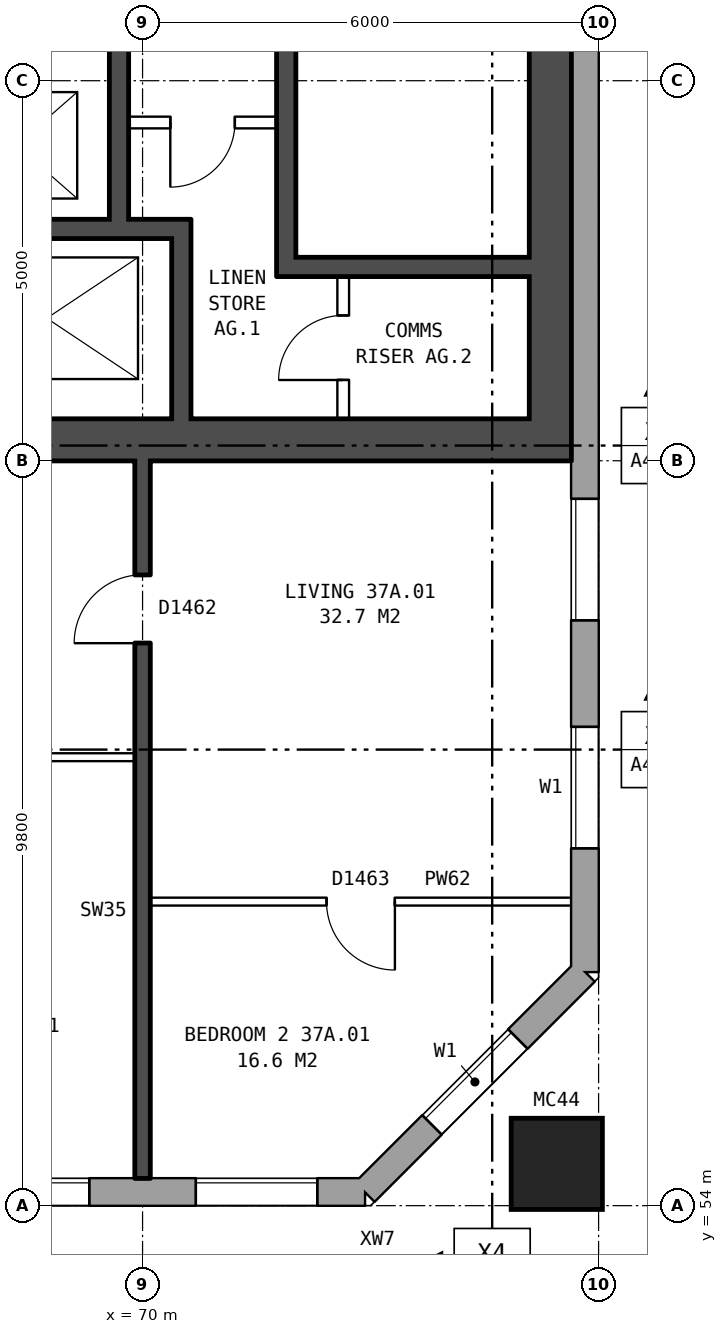
"""IFC4 building model, lengths in metres.
Left out: names, types, materials, properties, quantities, classifications, styles, units other than length and angle.
Written with IfcOpenShell. Run it as: python <this file> out.ifc"""

import sys

from ifc_helpers import new_model, si_unit, direction, frame, frame_2d, origin, origin_2d, place, context, subcontext, project, spatial, rectangle, hollow_rectangle, extrude, element, fill, save


model = new_model("IFC4")
c1 = context("Model", 3, precision=1e-05, world=origin(), true_north=direction((0.0, 1.0)))
c2 = subcontext(c1, "Body", "Model", "MODEL_VIEW")
j1 = project(units=[si_unit("LENGTHUNIT", "METRE"), si_unit("PLANEANGLEUNIT", "RADIAN")], contexts=[c1])
p1 = place(None, origin())
s1 = spatial("IfcSite", under=j1, at=p1, CompositionType="ELEMENT")
p2 = place(p1, origin())
s2 = spatial("IfcBuilding", under=s1, at=p2, CompositionType="ELEMENT")
p3 = place(p2, frame((0.0, 0.0, 133.0)))
s3 = spatial("IfcBuildingStorey", under=s2, at=p3, CompositionType="ELEMENT", Elevation=133.0)
p4 = place(p3, frame((75.45, 54.55, 0.0), z_axis=(0.0, 0.0, 1.0), x_axis=(1.0, 0.0, 0.0)))
e1 = element("IfcColumn", 1, at=p4, inside=s3, PredefinedType="COLUMN", context=c2, shape_type="SweptSolid", body=[
    extrude(hollow_rectangle(XDim=1.2, YDim=1.2, WallThickness=0.065, at=origin_2d()), origin(), (0.0, 0.0, 1.0), 3.1),
])
p5 = place(p3, frame((29.825, 54.18, 0.0), z_axis=(0.0, 0.0, 1.0), x_axis=(1.0, 0.0, 0.0)))
e2 = element("IfcWall", 2, at=p5, inside=s3, PredefinedType="STANDARD", context=c2, shape_type="SweptSolid", body=[
    extrude(rectangle(XDim=43.101, YDim=0.36, at=frame_2d((21.55, 0.0))), origin(), (0.0, 0.0, 1.0), 2.85),
])
p6 = place(p5, frame((1.875, 0.0, 0.8)))
e3 = element("IfcOpeningElement", 3, at=p6, cuts=e2, PredefinedType="OPENING", context=c2, shape_type="SweptSolid", body=[
    extrude(rectangle(XDim=1.6, YDim=1.8, at=frame_2d((0.8, 0.9))), frame((0.0, 0.19, 0.0), z_axis=(0.0, -1.0, 0.0), x_axis=(1.0, 0.0, 0.0)), (0.0, 0.0, 1.0), 0.38),
])
p7 = place(p5, frame((4.875, 0.0, 0.8)))
e4 = element("IfcOpeningElement", 4, at=p7, cuts=e2, PredefinedType="OPENING", context=c2, shape_type="SweptSolid", body=[
    extrude(rectangle(XDim=1.6, YDim=1.8, at=frame_2d((0.8, 0.9))), frame((0.0, 0.19, 0.0), z_axis=(0.0, -1.0, 0.0), x_axis=(1.0, 0.0, 0.0)), (0.0, 0.0, 1.0), 0.38),
])
p8 = place(p5, frame((7.875, 0.0, 0.8)))
e5 = element("IfcOpeningElement", 5, at=p8, cuts=e2, PredefinedType="OPENING", context=c2, shape_type="SweptSolid", body=[
    extrude(rectangle(XDim=1.6, YDim=1.8, at=frame_2d((0.8, 0.9))), frame((0.0, 0.19, 0.0), z_axis=(0.0, -1.0, 0.0), x_axis=(1.0, 0.0, 0.0)), (0.0, 0.0, 1.0), 0.38),
])
p9 = place(p5, frame((10.875, 0.0, 0.8)))
e6 = element("IfcOpeningElement", 6, at=p9, cuts=e2, PredefinedType="OPENING", context=c2, shape_type="SweptSolid", body=[
    extrude(rectangle(XDim=1.6, YDim=1.8, at=frame_2d((0.8, 0.9))), frame((0.0, 0.19, 0.0), z_axis=(0.0, -1.0, 0.0), x_axis=(1.0, 0.0, 0.0)), (0.0, 0.0, 1.0), 0.38),
])
p10 = place(p5, frame((14.275, 0.0, 0.8)))
e7 = element("IfcOpeningElement", 7, at=p10, cuts=e2, PredefinedType="OPENING", context=c2, shape_type="SweptSolid", body=[
    extrude(rectangle(XDim=0.8, YDim=0.9, at=frame_2d((0.4, 0.45))), frame((0.0, 0.19, 0.0), z_axis=(0.0, -1.0, 0.0), x_axis=(1.0, 0.0, 0.0)), (0.0, 0.0, 1.0), 0.38),
])
p11 = place(p5, frame((16.875, 0.0, 0.8)))
e8 = element("IfcOpeningElement", 8, at=p11, cuts=e2, PredefinedType="OPENING", context=c2, shape_type="SweptSolid", body=[
    extrude(rectangle(XDim=1.6, YDim=1.8, at=frame_2d((0.8, 0.9))), frame((0.0, 0.19, 0.0), z_axis=(0.0, -1.0, 0.0), x_axis=(1.0, 0.0, 0.0)), (0.0, 0.0, 1.0), 0.38),
])
p12 = place(p5, frame((19.875, 0.0, 0.8)))
e9 = element("IfcOpeningElement", 9, at=p12, cuts=e2, PredefinedType="OPENING", context=c2, shape_type="SweptSolid", body=[
    extrude(rectangle(XDim=1.6, YDim=1.8, at=frame_2d((0.8, 0.9))), frame((0.0, 0.19, 0.0), z_axis=(0.0, -1.0, 0.0), x_axis=(1.0, 0.0, 0.0)), (0.0, 0.0, 1.0), 0.38),
])
p13 = place(p5, frame((22.875, 0.0, 0.8)))
e10 = element("IfcOpeningElement", 10, at=p13, cuts=e2, PredefinedType="OPENING", context=c2, shape_type="SweptSolid", body=[
    extrude(rectangle(XDim=1.6, YDim=1.8, at=frame_2d((0.8, 0.9))), frame((0.0, 0.19, 0.0), z_axis=(0.0, -1.0, 0.0), x_axis=(1.0, 0.0, 0.0)), (0.0, 0.0, 1.0), 0.38),
])
p14 = place(p5, frame((25.875, 0.0, 0.8)))
e11 = element("IfcOpeningElement", 11, at=p14, cuts=e2, PredefinedType="OPENING", context=c2, shape_type="SweptSolid", body=[
    extrude(rectangle(XDim=1.6, YDim=1.8, at=frame_2d((0.8, 0.9))), frame((0.0, 0.19, 0.0), z_axis=(0.0, -1.0, 0.0), x_axis=(1.0, 0.0, 0.0)), (0.0, 0.0, 1.0), 0.38),
])
p15 = place(p5, frame((28.375, 0.0, 0.25)))
e12 = element("IfcOpeningElement", 12, at=p15, cuts=e2, PredefinedType="OPENING", context=c2, shape_type="SweptSolid", body=[
    extrude(rectangle(XDim=1.0, YDim=0.9, at=frame_2d((0.5, 0.45))), frame((0.0, 0.19, 0.0), z_axis=(0.0, -1.0, 0.0), x_axis=(1.0, 0.0, 0.0)), (0.0, 0.0, 1.0), 0.38),
])
p16 = place(p5, frame((31.875, 0.0, 0.8)))
e13 = element("IfcOpeningElement", 13, at=p16, cuts=e2, PredefinedType="OPENING", context=c2, shape_type="SweptSolid", body=[
    extrude(rectangle(XDim=1.6, YDim=1.8, at=frame_2d((0.8, 0.9))), frame((0.0, 0.19, 0.0), z_axis=(0.0, -1.0, 0.0), x_axis=(1.0, 0.0, 0.0)), (0.0, 0.0, 1.0), 0.38),
])
p17 = place(p5, frame((34.875, 0.0, 0.8)))
e14 = element("IfcOpeningElement", 14, at=p17, cuts=e2, PredefinedType="OPENING", context=c2, shape_type="SweptSolid", body=[
    extrude(rectangle(XDim=1.6, YDim=1.8, at=frame_2d((0.8, 0.9))), frame((0.0, 0.19, 0.0), z_axis=(0.0, -1.0, 0.0), x_axis=(1.0, 0.0, 0.0)), (0.0, 0.0, 1.0), 0.38),
])
p18 = place(p5, frame((37.875, 0.0, 0.8)))
e15 = element("IfcOpeningElement", 15, at=p18, cuts=e2, PredefinedType="OPENING", context=c2, shape_type="SweptSolid", body=[
    extrude(rectangle(XDim=1.6, YDim=1.8, at=frame_2d((0.8, 0.9))), frame((0.0, 0.19, 0.0), z_axis=(0.0, -1.0, 0.0), x_axis=(1.0, 0.0, 0.0)), (0.0, 0.0, 1.0), 0.38),
])
p19 = place(p5, frame((40.875, 0.0, 0.8)))
e16 = element("IfcOpeningElement", 16, at=p19, cuts=e2, PredefinedType="OPENING", context=c2, shape_type="SweptSolid", body=[
    extrude(rectangle(XDim=1.6, YDim=1.8, at=frame_2d((0.8, 0.9))), frame((0.0, 0.19, 0.0), z_axis=(0.0, -1.0, 0.0), x_axis=(1.0, 0.0, 0.0)), (0.0, 0.0, 1.0), 0.38),
])
p20 = place(p5, frame((15.375, 0.0, 0.8)))
e17 = element("IfcOpeningElement", 17, at=p20, cuts=e2, PredefinedType="OPENING", context=c2, shape_type="SweptSolid", body=[
    extrude(rectangle(XDim=0.6, YDim=1.8, at=frame_2d((0.3, 0.9))), frame((0.0, 0.19, 0.0), z_axis=(0.0, -1.0, 0.0), x_axis=(1.0, 0.0, 0.0)), (0.0, 0.0, 1.0), 0.38),
])
p21 = place(p5, frame((30.025, 0.0, 1.65)))
e18 = element("IfcOpeningElement", 18, at=p21, cuts=e2, PredefinedType="OPENING", context=c2, shape_type="SweptSolid", body=[
    extrude(rectangle(XDim=1.0, YDim=0.9, at=frame_2d((0.5, 0.45))), frame((0.0, 0.19, 0.0), z_axis=(0.0, -1.0, 0.0), x_axis=(1.0, 0.0, 0.0)), (0.0, 0.0, 1.0), 0.38),
])
p22 = place(p3, frame((72.925, 54.18, 0.0), z_axis=(0.0, 0.0, 1.0), x_axis=(0.707106781187, 0.707106781187, 0.0)))
e19 = element("IfcWall", 19, at=p22, inside=s3, PredefinedType="STANDARD", context=c2, shape_type="SweptSolid", body=[
    extrude(rectangle(XDim=4.094, YDim=0.36, at=frame_2d((2.047, 0.0))), origin(), (0.0, 0.0, 1.0), 2.85),
])
p23 = place(p22, frame((1.247, 0.0, 0.8)))
e20 = element("IfcOpeningElement", 20, at=p23, cuts=e19, PredefinedType="OPENING", context=c2, shape_type="SweptSolid", body=[
    extrude(rectangle(XDim=1.6, YDim=1.8, at=frame_2d((0.8, 0.9))), frame((0.0, 0.19, 0.0), z_axis=(0.0, -1.0, 0.0), x_axis=(1.0, 0.0, 0.0)), (0.0, 0.0, 1.0), 0.38),
])
p24 = place(p3, frame((75.82, 57.075, 0.0), z_axis=(0.0, 0.0, 1.0), x_axis=(0.0, 1.0, 0.0)))
e21 = element("IfcWall", 21, at=p24, inside=s3, PredefinedType="STANDARD", context=c2, shape_type="SweptSolid", body=[
    extrude(rectangle(XDim=25.851, YDim=0.36, at=frame_2d((12.925, 0.0))), origin(), (0.0, 0.0, 1.0), 2.85),
])
p25 = place(p24, frame((1.625, 0.0, 0.8)))
e22 = element("IfcOpeningElement", 22, at=p25, cuts=e21, PredefinedType="OPENING", context=c2, shape_type="SweptSolid", body=[
    extrude(rectangle(XDim=1.6, YDim=1.8, at=frame_2d((0.8, 0.9))), frame((0.0, 0.19, 0.0), z_axis=(0.0, -1.0, 0.0), x_axis=(1.0, 0.0, 0.0)), (0.0, 0.0, 1.0), 0.38),
])
p26 = place(p24, frame((4.625, 0.0, 0.8)))
e23 = element("IfcOpeningElement", 23, at=p26, cuts=e21, PredefinedType="OPENING", context=c2, shape_type="SweptSolid", body=[
    extrude(rectangle(XDim=1.6, YDim=1.8, at=frame_2d((0.8, 0.9))), frame((0.0, 0.19, 0.0), z_axis=(0.0, -1.0, 0.0), x_axis=(1.0, 0.0, 0.0)), (0.0, 0.0, 1.0), 0.38),
])
p27 = place(p24, frame((19.625, 0.0, 0.8)))
e24 = element("IfcOpeningElement", 24, at=p27, cuts=e21, PredefinedType="OPENING", context=c2, shape_type="SweptSolid", body=[
    extrude(rectangle(XDim=1.6, YDim=1.8, at=frame_2d((0.8, 0.9))), frame((0.0, 0.19, 0.0), z_axis=(0.0, -1.0, 0.0), x_axis=(1.0, 0.0, 0.0)), (0.0, 0.0, 1.0), 0.38),
])
p28 = place(p24, frame((22.625, 0.0, 0.8)))
e25 = element("IfcOpeningElement", 25, at=p28, cuts=e21, PredefinedType="OPENING", context=c2, shape_type="SweptSolid", body=[
    extrude(rectangle(XDim=1.6, YDim=1.8, at=frame_2d((0.8, 0.9))), frame((0.0, 0.19, 0.0), z_axis=(0.0, -1.0, 0.0), x_axis=(1.0, 0.0, 0.0)), (0.0, 0.0, 1.0), 0.38),
])
p29 = place(p3, frame((75.365, 63.8, 0.0), z_axis=(0.0, 0.0, 1.0), x_axis=(0.0, 1.0, 0.0)))
e26 = element("IfcWall", 26, at=p29, inside=s3, PredefinedType="SHEAR", context=c2, shape_type="SweptSolid", body=[
    extrude(rectangle(XDim=12.4, YDim=0.55, at=frame_2d((6.2, 0.0))), origin(), (0.0, 0.0, 1.0), 2.85),
])
p30 = place(p3, frame((67.19, 64.075, 0.0), z_axis=(0.0, 0.0, 1.0), x_axis=(1.0, 0.0, 0.0)))
e27 = element("IfcWall", 27, at=p30, inside=s3, PredefinedType="SHEAR", context=c2, shape_type="SweptSolid", body=[
    extrude(rectangle(XDim=7.9, YDim=0.55, at=frame_2d((3.95, 0.0))), origin(), (0.0, 0.0, 1.0), 2.85),
])
p31 = place(p3, frame((72.015, 66.35, 0.0), z_axis=(0.0, 0.0, 1.0), x_axis=(1.0, 0.0, 0.0)))
e28 = element("IfcWall", 28, at=p31, inside=s3, PredefinedType="SHEAR", context=c2, shape_type="SweptSolid", body=[
    extrude(rectangle(XDim=3.075, YDim=0.25, at=frame_2d((1.538, 0.0))), origin(), (0.0, 0.0, 1.0), 2.85),
])
p32 = place(p3, frame((67.19, 66.85, 0.0), z_axis=(0.0, 0.0, 1.0), x_axis=(1.0, 0.0, 0.0)))
e29 = element("IfcWall", 29, at=p32, inside=s3, PredefinedType="SHEAR", context=c2, shape_type="SweptSolid", body=[
    extrude(rectangle(XDim=3.445, YDim=0.25, at=frame_2d((1.723, 0.0))), origin(), (0.0, 0.0, 1.0), 2.85),
])
p33 = place(p3, frame((69.815, 68.25, 0.0), z_axis=(0.0, 0.0, 1.0), x_axis=(1.0, 0.0, 0.0)))
e30 = element("IfcWall", 30, at=p33, inside=s3, PredefinedType="PARTITIONING", context=c2, shape_type="SweptSolid", body=[
    extrude(rectangle(XDim=1.95, YDim=0.15, at=frame_2d((0.975, 0.0))), origin(), (0.0, 0.0, 1.0), 2.85),
])
p34 = place(p33, frame((0.55, 0.0, 0.0)))
e31 = element("IfcOpeningElement", 31, at=p34, cuts=e30, PredefinedType="OPENING", context=c2, shape_type="SweptSolid", body=[
    extrude(rectangle(XDim=0.85, YDim=2.1, at=frame_2d((0.425, 1.05))), frame((0.0, 0.085, 0.0), z_axis=(0.0, -1.0, 0.0), x_axis=(1.0, 0.0, 0.0)), (0.0, 0.0, 1.0), 0.17),
])
p35 = place(p3, frame((69.69, 66.975, 0.0), z_axis=(0.0, 0.0, 1.0), x_axis=(0.0, 1.0, 0.0)))
e32 = element("IfcWall", 32, at=p35, inside=s3, PredefinedType="SHEAR", context=c2, shape_type="SweptSolid", body=[
    extrude(rectangle(XDim=6.6, YDim=0.25, at=frame_2d((3.3, 0.0))), origin(), (0.0, 0.0, 1.0), 2.85),
])
p36 = place(p3, frame((70.51, 64.35, 0.0), z_axis=(0.0, 0.0, 1.0), x_axis=(0.0, 1.0, 0.0)))
e33 = element("IfcWall", 33, at=p36, inside=s3, PredefinedType="SHEAR", context=c2, shape_type="SweptSolid", body=[
    extrude(rectangle(XDim=2.375, YDim=0.25, at=frame_2d((1.188, 0.0))), origin(), (0.0, 0.0, 1.0), 2.85),
])
p37 = place(p3, frame((71.89, 66.225, 0.0), z_axis=(0.0, 0.0, 1.0), x_axis=(0.0, 1.0, 0.0)))
e34 = element("IfcWall", 34, at=p37, inside=s3, PredefinedType="SHEAR", context=c2, shape_type="SweptSolid", body=[
    extrude(rectangle(XDim=7.35, YDim=0.25, at=frame_2d((3.675, 0.0))), origin(), (0.0, 0.0, 1.0), 2.85),
])
p38 = place(p3, frame((72.64, 64.35, 0.0), z_axis=(0.0, 0.0, 1.0), x_axis=(0.0, 1.0, 0.0)))
e35 = element("IfcWall", 35, at=p38, inside=s3, PredefinedType="PARTITIONING", context=c2, shape_type="SweptSolid", body=[
    extrude(rectangle(XDim=1.875, YDim=0.15, at=frame_2d((0.938, 0.0))), origin(), (0.0, 0.0, 1.0), 2.85),
])
p39 = place(p38, frame((0.512, 0.0, 0.0)))
e36 = element("IfcOpeningElement", 36, at=p39, cuts=e35, PredefinedType="OPENING", context=c2, shape_type="SweptSolid", body=[
    extrude(rectangle(XDim=0.85, YDim=2.1, at=frame_2d((0.425, 1.05))), frame((0.0, 0.085, 0.0), z_axis=(0.0, -1.0, 0.0), x_axis=(1.0, 0.0, 0.0)), (0.0, 0.0, 1.0), 0.17),
])
p40 = place(p3, frame((70.1, 58.0, 0.0), z_axis=(0.0, 0.0, 1.0), x_axis=(1.0, 0.0, 0.0)))
e37 = element("IfcWall", 37, at=p40, inside=s3, PredefinedType="PARTITIONING", context=c2, shape_type="SweptSolid", body=[
    extrude(rectangle(XDim=5.54, YDim=0.1, at=frame_2d((2.77, 0.0))), origin(), (0.0, 0.0, 1.0), 2.85),
])
p41 = place(p40, frame((2.32, 0.0, 0.0)))
e38 = element("IfcOpeningElement", 38, at=p41, cuts=e37, PredefinedType="OPENING", context=c2, shape_type="SweptSolid", body=[
    extrude(rectangle(XDim=0.9, YDim=2.1, at=frame_2d((0.45, 1.05))), frame((0.0, 0.06, 0.0), z_axis=(0.0, -1.0, 0.0), x_axis=(1.0, 0.0, 0.0)), (0.0, 0.0, 1.0), 0.12),
])
p42 = place(p3, frame((64.1, 59.9, 0.0), z_axis=(0.0, 0.0, 1.0), x_axis=(1.0, 0.0, 0.0)))
e39 = element("IfcWall", 39, at=p42, inside=s3, PredefinedType="PARTITIONING", context=c2, shape_type="SweptSolid", body=[
    extrude(rectangle(XDim=5.8, YDim=0.1, at=frame_2d((2.9, 0.0))), origin(), (0.0, 0.0, 1.0), 2.85),
])
p43 = place(p42, frame((3.6, 0.0, 0.0)))
e40 = element("IfcOpeningElement", 40, at=p43, cuts=e39, PredefinedType="OPENING", context=c2, shape_type="SweptSolid", body=[
    extrude(rectangle(XDim=0.9, YDim=2.1, at=frame_2d((0.45, 1.05))), frame((0.0, 0.06, 0.0), z_axis=(0.0, -1.0, 0.0), x_axis=(1.0, 0.0, 0.0)), (0.0, 0.0, 1.0), 0.12),
])
p44 = place(p42, frame((0.7, 0.0, 0.0)))
e41 = element("IfcOpeningElement", 41, at=p44, cuts=e39, PredefinedType="OPENING", context=c2, shape_type="SweptSolid", body=[
    extrude(rectangle(XDim=0.9, YDim=2.1, at=frame_2d((0.45, 1.05))), frame((0.0, 0.06, 0.0), z_axis=(0.0, -1.0, 0.0), x_axis=(1.0, 0.0, 0.0)), (0.0, 0.0, 1.0), 0.12),
])
p45 = place(p3, frame((70.0, 54.36, 0.0), z_axis=(0.0, 0.0, 1.0), x_axis=(0.0, 1.0, 0.0)))
e42 = element("IfcWall", 42, at=p45, inside=s3, PredefinedType="SOLIDWALL", context=c2, shape_type="SweptSolid", body=[
    extrude(rectangle(XDim=9.44, YDim=0.2, at=frame_2d((4.72, 0.0))), origin(), (0.0, 0.0, 1.0), 2.85),
])
p46 = place(p45, frame((7.04, 0.0, 0.0)))
e43 = element("IfcOpeningElement", 43, at=p46, cuts=e42, PredefinedType="OPENING", context=c2, shape_type="SweptSolid", body=[
    extrude(rectangle(XDim=0.9, YDim=2.1, at=frame_2d((0.45, 1.05))), frame((0.0, 0.11, 0.0), z_axis=(0.0, -1.0, 0.0), x_axis=(1.0, 0.0, 0.0)), (0.0, 0.0, 1.0), 0.22),
])
p47 = place(p18, origin())
e44 = element("IfcWindow", 44, at=p47, inside=s3, PartitioningType="SINGLE_PANEL", PredefinedType="WINDOW", context=c2, shape_type="SweptSolid", body=[
    extrude(rectangle(XDim=1.6, YDim=1.8, at=frame_2d((0.8, 0.9))), frame((0.0, 0.15, 0.0), z_axis=(0.0, -1.0, 0.0), x_axis=(1.0, 0.0, 0.0)), (0.0, 0.0, 1.0), 0.06),
])
fill(e15, e44)
p48 = place(p19, origin())
e45 = element("IfcWindow", 45, at=p48, inside=s3, PartitioningType="SINGLE_PANEL", PredefinedType="WINDOW", context=c2, shape_type="SweptSolid", body=[
    extrude(rectangle(XDim=1.6, YDim=1.8, at=frame_2d((0.8, 0.9))), frame((0.0, 0.15, 0.0), z_axis=(0.0, -1.0, 0.0), x_axis=(1.0, 0.0, 0.0)), (0.0, 0.0, 1.0), 0.06),
])
fill(e16, e45)
p49 = place(p23, origin())
e46 = element("IfcWindow", 46, at=p49, inside=s3, PartitioningType="SINGLE_PANEL", PredefinedType="WINDOW", context=c2, shape_type="SweptSolid", body=[
    extrude(rectangle(XDim=1.6, YDim=1.8, at=frame_2d((0.8, 0.9))), frame((0.0, 0.15, 0.0), z_axis=(0.0, -1.0, 0.0), x_axis=(1.0, 0.0, 0.0)), (0.0, 0.0, 1.0), 0.06),
])
fill(e20, e46)
p50 = place(p25, origin())
e47 = element("IfcWindow", 47, at=p50, inside=s3, PartitioningType="SINGLE_PANEL", PredefinedType="WINDOW", context=c2, shape_type="SweptSolid", body=[
    extrude(rectangle(XDim=1.6, YDim=1.8, at=frame_2d((0.8, 0.9))), frame((0.0, 0.15, 0.0), z_axis=(0.0, -1.0, 0.0), x_axis=(1.0, 0.0, 0.0)), (0.0, 0.0, 1.0), 0.06),
])
fill(e22, e47)
p51 = place(p26, origin())
e48 = element("IfcWindow", 48, at=p51, inside=s3, PartitioningType="SINGLE_PANEL", PredefinedType="WINDOW", context=c2, shape_type="SweptSolid", body=[
    extrude(rectangle(XDim=1.6, YDim=1.8, at=frame_2d((0.8, 0.9))), frame((0.0, 0.15, 0.0), z_axis=(0.0, -1.0, 0.0), x_axis=(1.0, 0.0, 0.0)), (0.0, 0.0, 1.0), 0.06),
])
fill(e23, e48)
p52 = place(p34, frame((0.85, 0.0, 0.0), z_axis=(0.0, 0.0, 1.0), x_axis=(-1.0, 0.0, 0.0)))
e49 = element("IfcDoor", 49, at=p52, inside=s3, OperationType="SINGLE_SWING_RIGHT", PredefinedType="DOOR", context=c2, shape_type="SweptSolid", body=[
    extrude(rectangle(XDim=0.85, YDim=2.1, at=frame_2d((0.425, 1.05))), frame((0.0, 0.025, 0.0), z_axis=(0.0, -1.0, 0.0), x_axis=(1.0, 0.0, 0.0)), (0.0, 0.0, 1.0), 0.05),
])
fill(e31, e49)
p53 = place(p39, origin())
e50 = element("IfcDoor", 50, at=p53, inside=s3, OperationType="SINGLE_SWING_LEFT", PredefinedType="DOOR", context=c2, shape_type="SweptSolid", body=[
    extrude(rectangle(XDim=0.85, YDim=2.1, at=frame_2d((0.425, 1.05))), frame((0.0, 0.025, 0.0), z_axis=(0.0, -1.0, 0.0), x_axis=(1.0, 0.0, 0.0)), (0.0, 0.0, 1.0), 0.05),
])
fill(e36, e50)
p54 = place(p41, frame((0.9, 0.0, 0.0), z_axis=(0.0, 0.0, 1.0), x_axis=(-1.0, 0.0, 0.0)))
e51 = element("IfcDoor", 51, at=p54, inside=s3, OperationType="SINGLE_SWING_LEFT", PredefinedType="DOOR", context=c2, shape_type="SweptSolid", body=[
    extrude(rectangle(XDim=0.9, YDim=2.1, at=frame_2d((0.45, 1.05))), frame((0.0, 0.025, 0.0), z_axis=(0.0, -1.0, 0.0), x_axis=(1.0, 0.0, 0.0)), (0.0, 0.0, 1.0), 0.05),
])
fill(e38, e51)
p55 = place(p46, origin())
e52 = element("IfcDoor", 52, at=p55, inside=s3, OperationType="SINGLE_SWING_LEFT", PredefinedType="DOOR", context=c2, shape_type="SweptSolid", body=[
    extrude(rectangle(XDim=0.9, YDim=2.1, at=frame_2d((0.45, 1.05))), frame((0.0, 0.025, 0.0), z_axis=(0.0, -1.0, 0.0), x_axis=(1.0, 0.0, 0.0)), (0.0, 0.0, 1.0), 0.05),
])
fill(e43, e52)
save(model, sys.argv[1])
